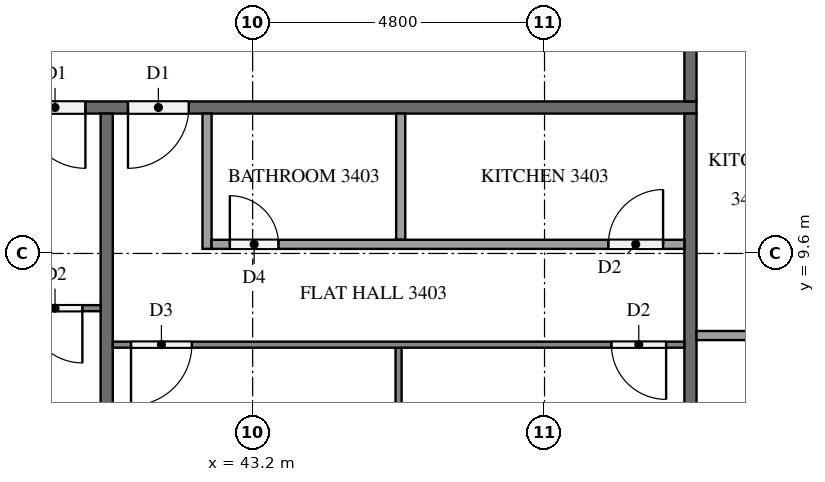
"""IFC4 building model, lengths in metres.
Left out: names, types, materials, properties, quantities, classifications, styles, units other than length and angle.
Written with IfcOpenShell. Run it as: python <this file> out.ifc"""

import sys

from ifc_helpers import new_model, si_unit, direction, frame, frame_2d, origin, place, context, subcontext, project, spatial, rectangle, extrude, element, fill, save


model = new_model("IFC4")
c1 = context("Model", 3, precision=1e-05, world=origin(), true_north=direction((0.0, 1.0)))
c2 = subcontext(c1, "Body", "Model", "MODEL_VIEW")
j1 = project(units=[si_unit("LENGTHUNIT", "METRE"), si_unit("PLANEANGLEUNIT", "RADIAN")], contexts=[c1])
p1 = place(None, origin())
s1 = spatial("IfcSite", under=j1, at=p1, CompositionType="ELEMENT")
p2 = place(p1, origin())
s2 = spatial("IfcBuilding", under=s1, at=p2, CompositionType="ELEMENT")
p3 = place(p2, frame((0.0, 0.0, 133.1)))
s3 = spatial("IfcBuildingStorey", under=s2, at=p3, CompositionType="ELEMENT", Elevation=133.1)
p4 = place(p3, frame((50.5, 12.0, 0.0), z_axis=(0.0, 0.0, 1.0), x_axis=(-1.0, 0.0, 0.0)))
e1 = element("IfcWall", 1, at=p4, inside=s3, PredefinedType="PARTITIONING", context=c2, shape_type="SweptSolid", body=[
    extrude(rectangle(XDim=38.6, YDim=0.2, at=frame_2d((19.3, 0.0))), origin(), (0.0, 0.0, 1.0), 3.2),
])
p5 = place(p4, frame((24.45, 0.0, 0.0)))
e2 = element("IfcOpeningElement", 2, at=p5, cuts=e1, PredefinedType="OPENING", context=c2, shape_type="SweptSolid", body=[
    extrude(rectangle(XDim=1.0, YDim=2.1, at=frame_2d((0.5, 1.05))), frame((0.0, 0.11, 0.0), z_axis=(0.0, -1.0, 0.0), x_axis=(1.0, 0.0, 0.0)), (0.0, 0.0, 1.0), 0.22),
])
p6 = place(p4, frame((10.05, 0.0, 0.0)))
e3 = element("IfcOpeningElement", 3, at=p6, cuts=e1, PredefinedType="OPENING", context=c2, shape_type="SweptSolid", body=[
    extrude(rectangle(XDim=1.0, YDim=2.1, at=frame_2d((0.5, 1.05))), frame((0.0, 0.11, 0.0), z_axis=(0.0, -1.0, 0.0), x_axis=(1.0, 0.0, 0.0)), (0.0, 0.0, 1.0), 0.22),
])
p7 = place(p4, frame((8.35, 0.0, 0.0)))
e4 = element("IfcOpeningElement", 4, at=p7, cuts=e1, PredefinedType="OPENING", context=c2, shape_type="SweptSolid", body=[
    extrude(rectangle(XDim=1.0, YDim=2.1, at=frame_2d((0.5, 1.05))), frame((0.0, 0.11, 0.0), z_axis=(0.0, -1.0, 0.0), x_axis=(1.0, 0.0, 0.0)), (0.0, 0.0, 1.0), 0.22),
])
p8 = place(p3, frame((50.4, 14.9, 0.0), z_axis=(0.0, 0.0, 1.0), x_axis=(0.0, -1.0, 0.0)))
e5 = element("IfcWall", 5, at=p8, inside=s3, PredefinedType="PARTITIONING", context=c2, shape_type="SweptSolid", body=[
    extrude(rectangle(XDim=2.8, YDim=0.2, at=frame_2d((1.4, 0.0))), origin(), (0.0, 0.0, 1.0), 3.2),
])
p9 = place(p8, frame((0.25, 0.0, 0.0)))
e6 = element("IfcOpeningElement", 6, at=p9, cuts=e5, PredefinedType="OPENING", context=c2, shape_type="SweptSolid", body=[
    extrude(rectangle(XDim=1.0, YDim=2.1, at=frame_2d((0.5, 1.05))), frame((0.0, 0.11, 0.0), z_axis=(0.0, -1.0, 0.0), x_axis=(1.0, 0.0, 0.0)), (0.0, 0.0, 1.0), 0.22),
])
for number, where, z_axis, x_axis in (
    (7, (40.8, 11.9, 0.0), (0.0, 0.0, 1.0), (0.0, -1.0, 0.0)),
    (8, (50.4, 11.9, 0.0), (0.0, 0.0, 1.0), (0.0, -1.0, 0.0)),
):
    element("IfcWall", number, at=place(p3, frame(where, z_axis=z_axis, x_axis=x_axis)), inside=s3, PredefinedType="PARTITIONING", context=c2, shape_type="SweptSolid", body=[
        extrude(rectangle(XDim=7.0, YDim=0.2, at=frame_2d((3.5, 0.0))), origin(), (0.0, 0.0, 1.0), 3.2),
    ])
p10 = place(p3, frame((40.7, 8.7, 0.0), z_axis=(0.0, 0.0, 1.0), x_axis=(-1.0, 0.0, 0.0)))
e9 = element("IfcWall", 9, at=p10, inside=s3, PredefinedType="PARTITIONING", context=c2, shape_type="SweptSolid", body=[
    extrude(rectangle(XDim=14.2, YDim=0.1, at=frame_2d((7.1, 0.0))), origin(), (0.0, 0.0, 1.0), 3.2),
])
p11 = place(p10, frame((0.3, 0.0, 0.0)))
e10 = element("IfcOpeningElement", 10, at=p11, cuts=e9, PredefinedType="OPENING", context=c2, shape_type="SweptSolid", body=[
    extrude(rectangle(XDim=0.9, YDim=2.1, at=frame_2d((0.45, 1.05))), frame((0.0, 0.06, 0.0), z_axis=(0.0, -1.0, 0.0), x_axis=(1.0, 0.0, 0.0)), (0.0, 0.0, 1.0), 0.12),
])
p12 = place(p10, frame((8.15, 0.0, 0.0)))
e11 = element("IfcOpeningElement", 11, at=p12, cuts=e9, PredefinedType="OPENING", context=c2, shape_type="SweptSolid", body=[
    extrude(rectangle(XDim=1.0, YDim=2.1, at=frame_2d((0.5, 1.05))), frame((0.0, 0.06, 0.0), z_axis=(0.0, -1.0, 0.0), x_axis=(1.0, 0.0, 0.0)), (0.0, 0.0, 1.0), 0.12),
])
p13 = place(p10, frame((9.85, 0.0, 0.0)))
e12 = element("IfcOpeningElement", 12, at=p13, cuts=e9, PredefinedType="OPENING", context=c2, shape_type="SweptSolid", body=[
    extrude(rectangle(XDim=0.9, YDim=2.1, at=frame_2d((0.45, 1.05))), frame((0.0, 0.06, 0.0), z_axis=(0.0, -1.0, 0.0), x_axis=(1.0, 0.0, 0.0)), (0.0, 0.0, 1.0), 0.12),
])
p14 = place(p3, frame((45.6, 8.05, 0.0), z_axis=(0.0, 0.0, 1.0), x_axis=(0.0, -1.0, 0.0)))
e13 = element("IfcWall", 13, at=p14, inside=s3, PredefinedType="PARTITIONING", context=c2, shape_type="SweptSolid", body=[
    extrude(rectangle(XDim=3.15, YDim=0.1, at=frame_2d((1.575, 0.0))), origin(), (0.0, 0.0, 1.0), 3.2),
])
p15 = place(p3, frame((50.3, 8.1, 0.0), z_axis=(0.0, 0.0, 1.0), x_axis=(-1.0, 0.0, 0.0)))
e14 = element("IfcWall", 14, at=p15, inside=s3, PredefinedType="PARTITIONING", context=c2, shape_type="SweptSolid", body=[
    extrude(rectangle(XDim=9.4, YDim=0.1, at=frame_2d((4.7, 0.0))), origin(), (0.0, 0.0, 1.0), 3.2),
])
p16 = place(p15, frame((8.1, 0.0, 0.0)))
e15 = element("IfcOpeningElement", 15, at=p16, cuts=e14, PredefinedType="OPENING", context=c2, shape_type="SweptSolid", body=[
    extrude(rectangle(XDim=1.0, YDim=2.1, at=frame_2d((0.5, 1.05))), frame((0.0, 0.06, 0.0), z_axis=(0.0, -1.0, 0.0), x_axis=(1.0, 0.0, 0.0)), (0.0, 0.0, 1.0), 0.12),
])
p17 = place(p15, frame((0.3, 0.0, 0.0)))
e16 = element("IfcOpeningElement", 16, at=p17, cuts=e14, PredefinedType="OPENING", context=c2, shape_type="SweptSolid", body=[
    extrude(rectangle(XDim=0.9, YDim=2.1, at=frame_2d((0.45, 1.05))), frame((0.0, 0.06, 0.0), z_axis=(0.0, -1.0, 0.0), x_axis=(1.0, 0.0, 0.0)), (0.0, 0.0, 1.0), 0.12),
])
p18 = place(p3, frame((45.635, 11.9, 0.0), z_axis=(0.0, 0.0, 1.0), x_axis=(0.0, -1.0, 0.0)))
e17 = element("IfcWall", 17, at=p18, inside=s3, PredefinedType="PARTITIONING", context=c2, shape_type="SweptSolid", body=[
    extrude(rectangle(XDim=2.075, YDim=0.15, at=frame_2d((1.038, 0.0))), origin(), (0.0, 0.0, 1.0), 3.2),
])
p19 = place(p3, frame((42.45, 11.9, 0.0), z_axis=(0.0, 0.0, 1.0), x_axis=(0.0, -1.0, 0.0)))
e18 = element("IfcWall", 18, at=p19, inside=s3, PredefinedType="PARTITIONING", context=c2, shape_type="SweptSolid", body=[
    extrude(rectangle(XDim=2.225, YDim=0.15, at=frame_2d((1.112, 0.0))), origin(), (0.0, 0.0, 1.0), 3.2),
])
p20 = place(p3, frame((42.525, 9.75, 0.0), z_axis=(0.0, 0.0, 1.0), x_axis=(1.0, 0.0, 0.0)))
e19 = element("IfcWall", 19, at=p20, inside=s3, PredefinedType="PARTITIONING", context=c2, shape_type="SweptSolid", body=[
    extrude(rectangle(XDim=7.775, YDim=0.15, at=frame_2d((3.888, 0.0))), origin(), (0.0, 0.0, 1.0), 3.2),
])
p21 = place(p20, frame((0.3, 0.0, 0.0)))
e20 = element("IfcOpeningElement", 20, at=p21, cuts=e19, PredefinedType="OPENING", context=c2, shape_type="SweptSolid", body=[
    extrude(rectangle(XDim=0.8, YDim=2.1, at=frame_2d((0.4, 1.05))), frame((0.0, 0.085, 0.0), z_axis=(0.0, -1.0, 0.0), x_axis=(1.0, 0.0, 0.0)), (0.0, 0.0, 1.0), 0.17),
])
p22 = place(p20, frame((6.525, 0.0, 0.0)))
e21 = element("IfcOpeningElement", 21, at=p22, cuts=e19, PredefinedType="OPENING", context=c2, shape_type="SweptSolid", body=[
    extrude(rectangle(XDim=0.9, YDim=2.1, at=frame_2d((0.45, 1.05))), frame((0.0, 0.085, 0.0), z_axis=(0.0, -1.0, 0.0), x_axis=(1.0, 0.0, 0.0)), (0.0, 0.0, 1.0), 0.17),
])
p23 = place(p3, frame((50.5, 8.25, 0.0), z_axis=(0.0, 0.0, 1.0), x_axis=(1.0, 0.0, 0.0)))
e22 = element("IfcWall", 22, at=p23, inside=s3, PredefinedType="PARTITIONING", context=c2, shape_type="SweptSolid", body=[
    extrude(rectangle(XDim=1.775, YDim=0.15, at=frame_2d((0.887, 0.0))), origin(), (0.0, 0.0, 1.0), 3.2),
])
p24 = place(p6, origin())
e23 = element("IfcDoor", 23, at=p24, inside=s3, OperationType="SINGLE_SWING_LEFT", PredefinedType="DOOR", context=c2, shape_type="SweptSolid", body=[
    extrude(rectangle(XDim=1.0, YDim=2.1, at=frame_2d((0.5, 1.05))), frame((0.0, 0.025, 0.0), z_axis=(0.0, -1.0, 0.0), x_axis=(1.0, 0.0, 0.0)), (0.0, 0.0, 1.0), 0.05),
])
fill(e3, e23)
p25 = place(p7, origin())
e24 = element("IfcDoor", 24, at=p25, inside=s3, OperationType="SINGLE_SWING_RIGHT", PredefinedType="DOOR", context=c2, shape_type="SweptSolid", body=[
    extrude(rectangle(XDim=1.0, YDim=2.1, at=frame_2d((0.5, 1.05))), frame((0.0, 0.025, 0.0), z_axis=(0.0, -1.0, 0.0), x_axis=(1.0, 0.0, 0.0)), (0.0, 0.0, 1.0), 0.05),
])
fill(e4, e24)
p26 = place(p11, origin())
e25 = element("IfcDoor", 25, at=p26, inside=s3, OperationType="SINGLE_SWING_LEFT", PredefinedType="DOOR", context=c2, shape_type="SweptSolid", body=[
    extrude(rectangle(XDim=0.9, YDim=2.1, at=frame_2d((0.45, 1.05))), frame((0.0, 0.025, 0.0), z_axis=(0.0, -1.0, 0.0), x_axis=(1.0, 0.0, 0.0)), (0.0, 0.0, 1.0), 0.05),
])
fill(e10, e25)
p27 = place(p16, origin())
e26 = element("IfcDoor", 26, at=p27, inside=s3, OperationType="SINGLE_SWING_RIGHT", PredefinedType="DOOR", context=c2, shape_type="SweptSolid", body=[
    extrude(rectangle(XDim=1.0, YDim=2.1, at=frame_2d((0.5, 1.05))), frame((0.0, 0.025, 0.0), z_axis=(0.0, -1.0, 0.0), x_axis=(1.0, 0.0, 0.0)), (0.0, 0.0, 1.0), 0.05),
])
fill(e15, e26)
p28 = place(p17, origin())
e27 = element("IfcDoor", 27, at=p28, inside=s3, OperationType="SINGLE_SWING_LEFT", PredefinedType="DOOR", context=c2, shape_type="SweptSolid", body=[
    extrude(rectangle(XDim=0.9, YDim=2.1, at=frame_2d((0.45, 1.05))), frame((0.0, 0.025, 0.0), z_axis=(0.0, -1.0, 0.0), x_axis=(1.0, 0.0, 0.0)), (0.0, 0.0, 1.0), 0.05),
])
fill(e16, e27)
p29 = place(p21, origin())
e28 = element("IfcDoor", 28, at=p29, inside=s3, OperationType="SINGLE_SWING_LEFT", PredefinedType="DOOR", context=c2, shape_type="SweptSolid", body=[
    extrude(rectangle(XDim=0.8, YDim=2.1, at=frame_2d((0.4, 1.05))), frame((0.0, 0.025, 0.0), z_axis=(0.0, -1.0, 0.0), x_axis=(1.0, 0.0, 0.0)), (0.0, 0.0, 1.0), 0.05),
])
fill(e20, e28)
p30 = place(p22, origin())
e29 = element("IfcDoor", 29, at=p30, inside=s3, OperationType="SINGLE_SWING_RIGHT", PredefinedType="DOOR", context=c2, shape_type="SweptSolid", body=[
    extrude(rectangle(XDim=0.9, YDim=2.1, at=frame_2d((0.45, 1.05))), frame((0.0, 0.025, 0.0), z_axis=(0.0, -1.0, 0.0), x_axis=(1.0, 0.0, 0.0)), (0.0, 0.0, 1.0), 0.05),
])
fill(e21, e29)
save(model, sys.argv[1])
